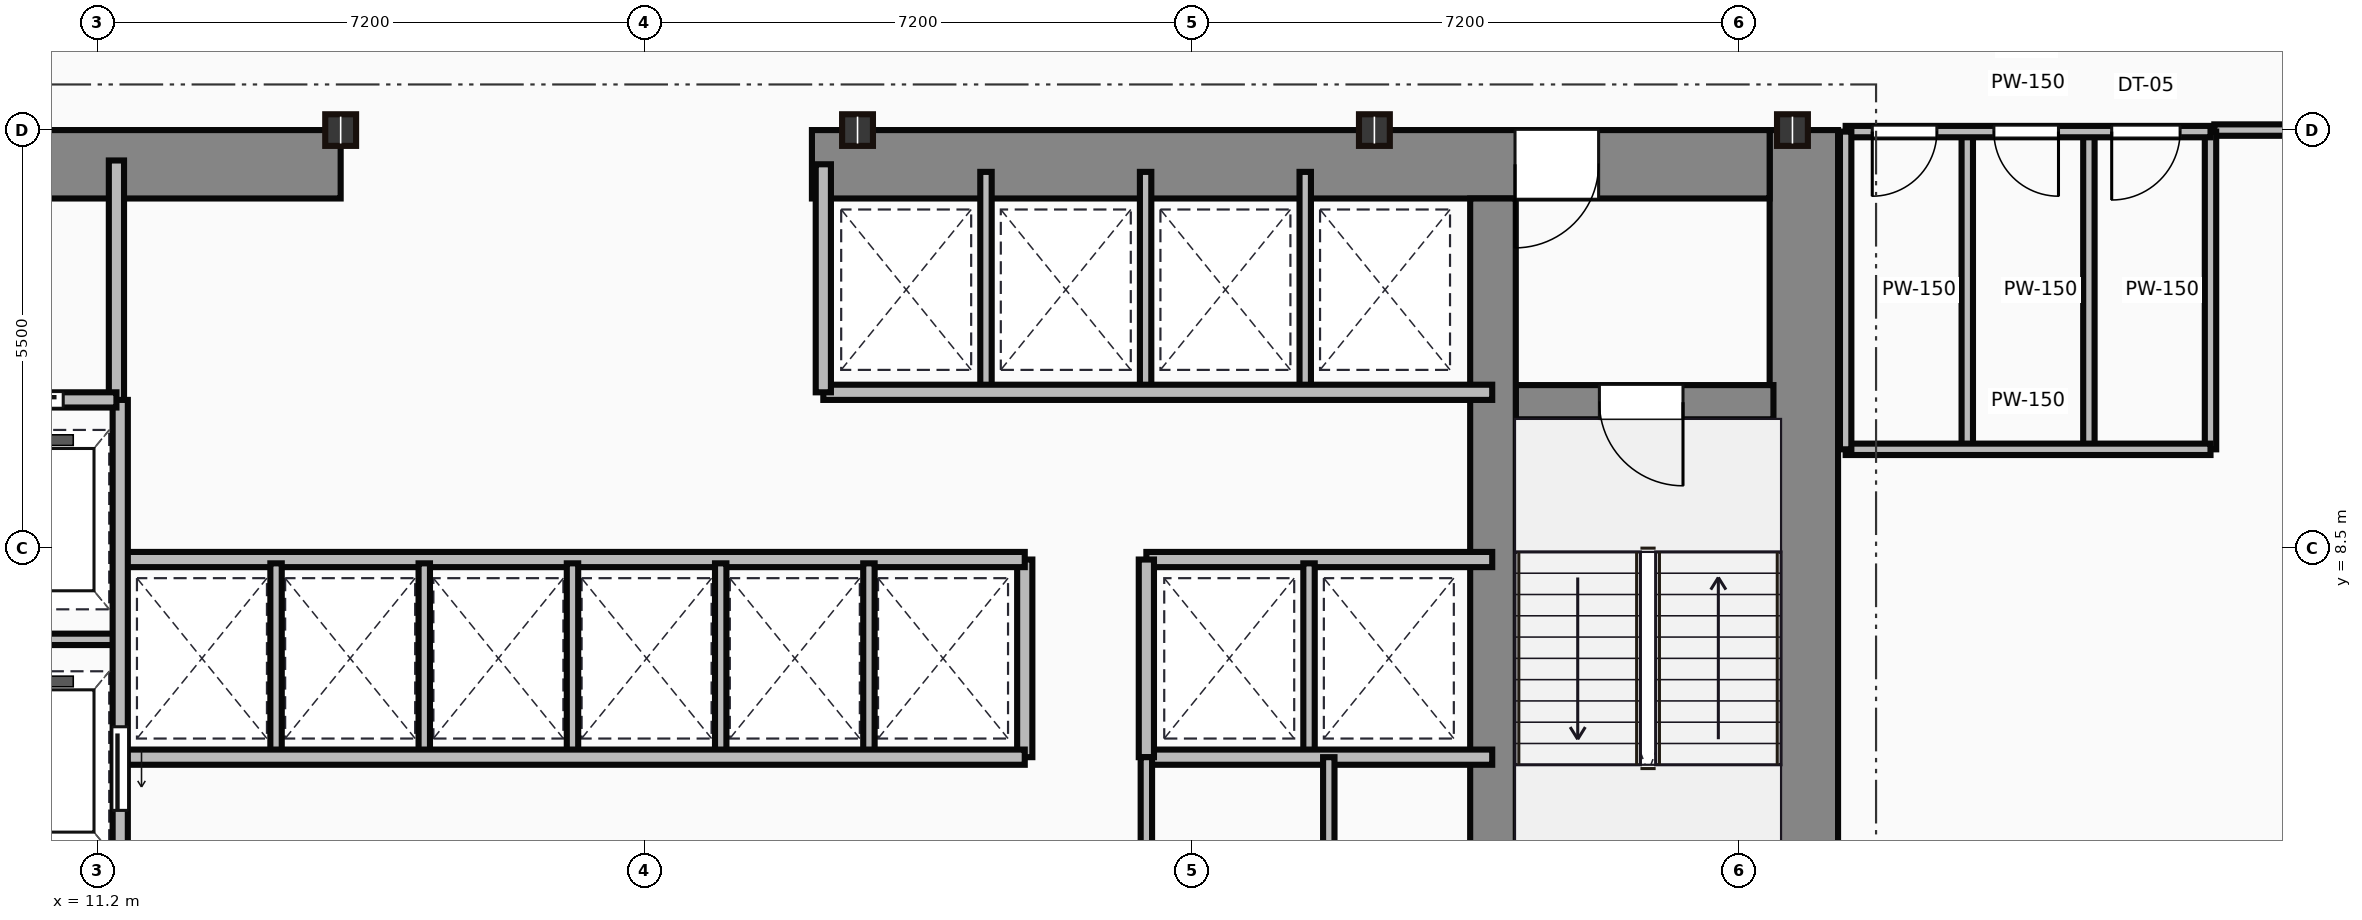
"""IFC4 building model, lengths in metres.
Left out: names, types, materials, properties, quantities, classifications, styles, units other than length and angle.
Written with IfcOpenShell. Run it as: python <this file> out.ifc"""

import sys

from ifc_helpers import new_model, si_unit, direction, frame, frame_2d, origin, origin_2d, place, context, subcontext, project, spatial, rectangle, i_section, extrude, source, transform, mapped, element, fill, save


model = new_model("IFC4")
c1 = context("Model", 3, precision=1e-05, world=origin(), true_north=direction((0.0, 1.0)))
c2 = subcontext(c1, "Body", "Model", "MODEL_VIEW")
j1 = project(units=[si_unit("LENGTHUNIT", "METRE"), si_unit("PLANEANGLEUNIT", "RADIAN")], contexts=[c1])
p1 = place(None, origin())
s1 = spatial("IfcSite", under=j1, at=p1, CompositionType="ELEMENT")
p2 = place(p1, origin())
s2 = spatial("IfcBuilding", under=s1, at=p2, CompositionType="ELEMENT")
p3 = place(p2, frame((0.0, 0.0, 36.15)))
s3 = spatial("IfcBuildingStorey", under=s2, at=p3, CompositionType="ELEMENT", Elevation=36.15)
m1 = source(origin(), c2, "Body", "SweptSolid", [
    extrude(rectangle(XDim=13.1, YDim=0.9, at=frame_2d((6.55, 0.0))), origin(), (0.0, 0.0, 1.0), 3.65),
])
p4 = place(p3, frame((33.65, 0.9, 0.0), z_axis=(0.0, 0.0, 1.0), x_axis=(0.0, 1.0, 0.0)))
e1 = element("IfcWall", 1, at=p4, inside=s3, PredefinedType="SHEAR", context=c2, shape_type="MappedRepresentation", body=[
    mapped(m1, transform((0.0, 0.0, 0.0))),
])
m2 = source(origin(), c2, "Body", "SweptSolid", [
    extrude(rectangle(XDim=9.1, YDim=0.9, at=frame_2d((4.55, 0.0))), origin(), (0.0, 0.0, 1.0), 3.65),
])
p5 = place(p3, frame((5.3, 13.55, 0.0), z_axis=(0.0, 0.0, 1.0), x_axis=(1.0, 0.0, 0.0)))
e2 = element("IfcWall", 2, at=p5, inside=s3, PredefinedType="SHEAR", context=c2, shape_type="MappedRepresentation", body=[
    mapped(m2, transform((0.0, 0.0, 0.0))),
])
p6 = place(p5, frame((4.1, 0.0, 0.0)))
e3 = element("IfcOpeningElement", 3, at=p6, cuts=e2, PredefinedType="OPENING", context=c2, shape_type="SweptSolid", body=[
    extrude(rectangle(XDim=1.1, YDim=2.15, at=frame_2d((0.55, 1.075))), frame((0.0, 0.46, 0.0), z_axis=(0.0, -1.0, 0.0), x_axis=(1.0, 0.0, 0.0)), (0.0, 0.0, 1.0), 0.92),
])
m3 = source(origin(), c2, "Body", "SweptSolid", [
    extrude(rectangle(XDim=12.6, YDim=0.9, at=frame_2d((6.3, 0.0))), origin(), (0.0, 0.0, 1.0), 3.65),
])
p7 = place(p3, frame((20.6, 13.55, 0.0), z_axis=(0.0, 0.0, 1.0), x_axis=(1.0, 0.0, 0.0)))
e4 = element("IfcWall", 4, at=p7, inside=s3, PredefinedType="SHEAR", context=c2, shape_type="MappedRepresentation", body=[
    mapped(m3, transform((0.0, 0.0, 0.0))),
])
p8 = place(p7, frame((9.25, 0.0, 0.0)))
e5 = element("IfcOpeningElement", 5, at=p8, cuts=e4, PredefinedType="OPENING", context=c2, shape_type="SweptSolid", body=[
    extrude(rectangle(XDim=1.1, YDim=2.15, at=frame_2d((0.55, 1.075))), frame((0.0, 0.46, 0.0), z_axis=(0.0, -1.0, 0.0), x_axis=(1.0, 0.0, 0.0)), (0.0, 0.0, 1.0), 0.92),
])
m4 = source(origin(), c2, "Body", "SweptSolid", [
    extrude(rectangle(XDim=12.2, YDim=0.6, at=frame_2d((6.1, 0.0))), origin(), (0.0, 0.0, 1.0), 3.65),
])
p9 = place(p3, frame((29.56, 0.9, 0.0), z_axis=(0.0, 0.0, 1.0), x_axis=(0.0, 1.0, 0.0)))
e6 = element("IfcWall", 6, at=p9, inside=s3, PredefinedType="SHEAR", context=c2, shape_type="MappedRepresentation", body=[
    mapped(m4, transform((0.0, 0.0, 0.0))),
])
m5 = source(origin(), c2, "Body", "SweptSolid", [
    extrude(rectangle(XDim=3.39, YDim=0.45, at=frame_2d((1.695, 0.0))), origin(), (0.0, 0.0, 1.0), 3.65),
])
p10 = place(p3, frame((29.86, 10.42, 0.0), z_axis=(0.0, 0.0, 1.0), x_axis=(1.0, 0.0, 0.0)))
e7 = element("IfcWall", 7, at=p10, inside=s3, PredefinedType="SHEAR", context=c2, shape_type="MappedRepresentation", body=[
    mapped(m5, transform((0.0, 0.0, 0.0))),
])
p11 = place(p10, frame((1.1, 0.0, 0.0)))
e8 = element("IfcOpeningElement", 8, at=p11, cuts=e7, PredefinedType="OPENING", context=c2, shape_type="SweptSolid", body=[
    extrude(rectangle(XDim=1.1, YDim=2.15, at=frame_2d((0.55, 1.075))), frame((0.0, 0.235, 0.0), z_axis=(0.0, -1.0, 0.0), x_axis=(1.0, 0.0, 0.0)), (0.0, 0.0, 1.0), 0.47),
])
m6 = source(origin(), c2, "Body", "SweptSolid", [
    extrude(i_section(OverallWidth=0.406, OverallDepth=0.416, WebThickness=0.03, FlangeThickness=0.048, at=origin_2d()), origin(), (0.0, 0.0, 1.0), 3.65),
])
for number, where, z_axis, x_axis in (
    (9, (14.4, 14.0, 0.0), (0.0, 0.0, 1.0), (1.0, 0.0, 0.0)),
    (10, (21.2, 14.0, 0.0), (0.0, 0.0, 1.0), (1.0, 0.0, 0.0)),
    (11, (28.0, 14.0, 0.0), (0.0, 0.0, 1.0), (1.0, 0.0, 0.0)),
    (12, (33.5, 14.0, 0.0), (0.0, 0.0, 1.0), (1.0, 0.0, 0.0)),
):
    element("IfcColumn", number, at=place(p3, frame(where, z_axis=z_axis, x_axis=x_axis)), inside=s3, PredefinedType="COLUMN", context=c2, shape_type="MappedRepresentation", body=[
        mapped(m6, transform((0.0, 0.0, 0.0))),
    ])
m7 = source(origin(), c2, "Body", "SweptSolid", [
    extrude(rectangle(XDim=3.18, YDim=0.2, at=frame_2d((1.59, 0.0))), origin(), (0.0, 0.0, 1.0), 3.4),
])
p12 = place(p3, frame((11.45, 10.42, 0.0), z_axis=(0.0, 0.0, 1.0), x_axis=(0.0, 1.0, 0.0)))
e13 = element("IfcWall", 13, at=p12, inside=s3, PredefinedType="PARTITIONING", context=c2, shape_type="MappedRepresentation", body=[
    mapped(m7, transform((0.0, 0.0, 0.0))),
])
m8 = source(origin(), c2, "Body", "SweptSolid", [
    extrude(rectangle(XDim=2.35, YDim=0.2, at=frame_2d((1.175, 0.0))), origin(), (0.0, 0.0, 1.0), 3.4),
])
p13 = place(p3, frame((9.1, 10.45, 0.0), z_axis=(0.0, 0.0, 1.0), x_axis=(1.0, 0.0, 0.0)))
e14 = element("IfcWall", 14, at=p13, inside=s3, PredefinedType="PARTITIONING", context=c2, shape_type="MappedRepresentation", body=[
    mapped(m8, transform((0.0, 0.0, 0.0))),
])
p14 = place(p13, frame((0.55, 0.0, 0.0)))
e15 = element("IfcOpeningElement", 15, at=p14, cuts=e14, PredefinedType="OPENING", context=c2, shape_type="SweptSolid", body=[
    extrude(rectangle(XDim=1.1, YDim=2.15, at=frame_2d((0.55, 1.075))), frame((0.0, 0.11, 0.0), z_axis=(0.0, -1.0, 0.0), x_axis=(1.0, 0.0, 0.0)), (0.0, 0.0, 1.0), 0.22),
])
m9 = source(origin(), c2, "Body", "SweptSolid", [
    extrude(rectangle(XDim=9.6, YDim=0.2, at=frame_2d((4.8, 0.0))), origin(), (0.0, 0.0, 1.0), 3.4),
])
p15 = place(p3, frame((11.5, 0.85, 0.0), z_axis=(0.0, 0.0, 1.0), x_axis=(0.0, 1.0, 0.0)))
e16 = element("IfcWall", 16, at=p15, inside=s3, PredefinedType="PARTITIONING", context=c2, shape_type="MappedRepresentation", body=[
    mapped(m9, transform((0.0, 0.0, 0.0))),
])
p16 = place(p15, frame((4.2, 0.0, 0.0)))
e17 = element("IfcOpeningElement", 17, at=p16, cuts=e16, PredefinedType="OPENING", context=c2, shape_type="SweptSolid", body=[
    extrude(rectangle(XDim=1.1, YDim=2.15, at=frame_2d((0.55, 1.075))), frame((0.0, 0.11, 0.0), z_axis=(0.0, -1.0, 0.0), x_axis=(1.0, 0.0, 0.0)), (0.0, 0.0, 1.0), 0.22),
])
p17 = place(p15, frame((0.9, 0.0, 0.0)))
e18 = element("IfcOpeningElement", 18, at=p17, cuts=e16, PredefinedType="OPENING", context=c2, shape_type="SweptSolid", body=[
    extrude(rectangle(XDim=1.2, YDim=2.15, at=frame_2d((0.6, 1.075))), frame((0.0, 0.11, 0.0), z_axis=(0.0, -1.0, 0.0), x_axis=(1.0, 0.0, 0.0)), (0.0, 0.0, 1.0), 0.22),
])
m10 = source(origin(), c2, "Body", "SweptSolid", [
    extrude(rectangle(XDim=2.4, YDim=0.15, at=frame_2d((1.2, 0.0))), origin(), (0.0, 0.0, 1.0), 3.4),
])
p18 = place(p3, frame((9.1, 7.3, 0.0), z_axis=(0.0, 0.0, 1.0), x_axis=(1.0, 0.0, 0.0)))
e19 = element("IfcWall", 19, at=p18, inside=s3, PredefinedType="PARTITIONING", context=c2, shape_type="MappedRepresentation", body=[
    mapped(m10, transform((0.0, 0.0, 0.0))),
])
m11 = source(origin(), c2, "Body", "SweptSolid", [
    extrude(rectangle(XDim=11.85, YDim=0.2, at=frame_2d((5.925, 0.0))), origin(), (0.0, 0.0, 1.0), 3.4),
])
for number, where, z_axis, x_axis in (
    (20, (11.55, 5.75, 0.0), (0.0, 0.0, 1.0), (1.0, 0.0, 0.0)),
    (21, (11.55, 8.35, 0.0), (0.0, 0.0, 1.0), (1.0, 0.0, 0.0)),
):
    element("IfcWall", number, at=place(p3, frame(where, z_axis=z_axis, x_axis=x_axis)), inside=s3, PredefinedType="PARTITIONING", context=c2, shape_type="MappedRepresentation", body=[
        mapped(m11, transform((0.0, 0.0, 0.0))),
    ])
m12 = source(origin(), c2, "Body", "SweptSolid", [
    extrude(rectangle(XDim=2.6, YDim=0.2, at=frame_2d((1.3, 0.0))), origin(), (0.0, 0.0, 1.0), 3.4),
])
p19 = place(p3, frame((23.4, 5.75, 0.0), z_axis=(0.0, 0.0, 1.0), x_axis=(0.0, 1.0, 0.0)))
e22 = element("IfcWall", 22, at=p19, inside=s3, PredefinedType="PARTITIONING", context=c2, shape_type="MappedRepresentation", body=[
    mapped(m12, transform((0.0, 0.0, 0.0))),
])
m13 = source(origin(), c2, "Body", "SweptSolid", [
    extrude(rectangle(XDim=2.5, YDim=0.15, at=frame_2d((1.25, 0.0))), origin(), (0.0, 0.0, 1.0), 3.4),
])
for number, where, z_axis, x_axis in (
    (23, (13.55, 5.8, 0.0), (0.0, 0.0, 1.0), (0.0, 1.0, 0.0)),
    (24, (15.5, 5.8, 0.0), (0.0, 0.0, 1.0), (0.0, 1.0, 0.0)),
    (25, (17.45, 5.8, 0.0), (0.0, 0.0, 1.0), (0.0, 1.0, 0.0)),
    (26, (19.4, 5.8, 0.0), (0.0, 0.0, 1.0), (0.0, 1.0, 0.0)),
    (27, (21.35, 5.8, 0.0), (0.0, 0.0, 1.0), (0.0, 1.0, 0.0)),
):
    element("IfcWall", number, at=place(p3, frame(where, z_axis=z_axis, x_axis=x_axis)), inside=s3, PredefinedType="PARTITIONING", context=c2, shape_type="MappedRepresentation", body=[
        mapped(m13, transform((0.0, 0.0, 0.0))),
    ])
m14 = source(origin(), c2, "Body", "SweptSolid", [
    extrude(rectangle(XDim=8.8, YDim=0.2, at=frame_2d((4.4, 0.0))), origin(), (0.0, 0.0, 1.0), 3.4),
])
p20 = place(p3, frame((20.75, 10.55, 0.0), z_axis=(0.0, 0.0, 1.0), x_axis=(1.0, 0.0, 0.0)))
e28 = element("IfcWall", 28, at=p20, inside=s3, PredefinedType="PARTITIONING", context=c2, shape_type="MappedRepresentation", body=[
    mapped(m14, transform((0.0, 0.0, 0.0))),
])
m15 = source(origin(), c2, "Body", "SweptSolid", [
    extrude(rectangle(XDim=3.0, YDim=0.2, at=frame_2d((1.5, 0.0))), origin(), (0.0, 0.0, 1.0), 3.4),
])
p21 = place(p3, frame((20.75, 10.55, 0.0), z_axis=(0.0, 0.0, 1.0), x_axis=(0.0, 1.0, 0.0)))
e29 = element("IfcWall", 29, at=p21, inside=s3, PredefinedType="PARTITIONING", context=c2, shape_type="MappedRepresentation", body=[
    mapped(m15, transform((0.0, 0.0, 0.0))),
])
m16 = source(origin(), c2, "Body", "SweptSolid", [
    extrude(rectangle(XDim=2.85, YDim=0.15, at=frame_2d((1.425, 0.0))), origin(), (0.0, 0.0, 1.0), 3.4),
])
for number, where, z_axis, x_axis in (
    (30, (22.89, 10.6, 0.0), (0.0, 0.0, 1.0), (0.0, 1.0, 0.0)),
    (31, (24.99, 10.6, 0.0), (0.0, 0.0, 1.0), (0.0, 1.0, 0.0)),
    (32, (27.09, 10.6, 0.0), (0.0, 0.0, 1.0), (0.0, 1.0, 0.0)),
):
    element("IfcWall", number, at=place(p3, frame(where, z_axis=z_axis, x_axis=x_axis)), inside=s3, PredefinedType="PARTITIONING", context=c2, shape_type="MappedRepresentation", body=[
        mapped(m16, transform((0.0, 0.0, 0.0))),
    ])
m17 = source(origin(), c2, "Body", "SweptSolid", [
    extrude(rectangle(XDim=4.55, YDim=0.2, at=frame_2d((2.275, 0.0))), origin(), (0.0, 0.0, 1.0), 3.4),
])
for number, where, z_axis, x_axis in (
    (33, (25.0, 8.35, 0.0), (0.0, 0.0, 1.0), (1.0, 0.0, 0.0)),
    (34, (25.0, 5.75, 0.0), (0.0, 0.0, 1.0), (1.0, 0.0, 0.0)),
):
    element("IfcWall", number, at=place(p3, frame(where, z_axis=z_axis, x_axis=x_axis)), inside=s3, PredefinedType="PARTITIONING", context=c2, shape_type="MappedRepresentation", body=[
        mapped(m17, transform((0.0, 0.0, 0.0))),
    ])
p22 = place(p3, frame((25.0, 5.75, 0.0), z_axis=(0.0, 0.0, 1.0), x_axis=(0.0, 1.0, 0.0)))
e35 = element("IfcWall", 35, at=p22, inside=s3, PredefinedType="PARTITIONING", context=c2, shape_type="MappedRepresentation", body=[
    mapped(m12, transform((0.0, 0.0, 0.0))),
])
p23 = place(p3, frame((27.14, 5.8, 0.0), z_axis=(0.0, 0.0, 1.0), x_axis=(0.0, 1.0, 0.0)))
e36 = element("IfcWall", 36, at=p23, inside=s3, PredefinedType="PARTITIONING", context=c2, shape_type="MappedRepresentation", body=[
    mapped(m13, transform((0.0, 0.0, 0.0))),
])
m18 = source(origin(), c2, "Body", "SweptSolid", [
    extrude(rectangle(XDim=4.9, YDim=0.15, at=frame_2d((2.45, 0.0))), origin(), (0.0, 0.0, 1.0), 3.4),
])
p24 = place(p3, frame((25.0, 0.85, 0.0), z_axis=(0.0, 0.0, 1.0), x_axis=(0.0, 1.0, 0.0)))
e37 = element("IfcWall", 37, at=p24, inside=s3, PredefinedType="PARTITIONING", context=c2, shape_type="MappedRepresentation", body=[
    mapped(m18, transform((0.0, 0.0, 0.0))),
])
p25 = place(p24, frame((2.5, 0.0, 0.0)))
e38 = element("IfcOpeningElement", 38, at=p25, cuts=e37, PredefinedType="OPENING", context=c2, shape_type="SweptSolid", body=[
    extrude(rectangle(XDim=0.95, YDim=2.15, at=frame_2d((0.475, 1.075))), frame((0.0, 0.085, 0.0), z_axis=(0.0, -1.0, 0.0), x_axis=(1.0, 0.0, 0.0)), (0.0, 0.0, 1.0), 0.17),
])
m19 = source(origin(), c2, "Body", "SweptSolid", [
    extrude(rectangle(XDim=3.4, YDim=0.15, at=frame_2d((1.7, 0.0))), origin(), (0.0, 0.0, 1.0), 3.4),
])
p26 = place(p3, frame((27.4, 2.35, 0.0), z_axis=(0.0, 0.0, 1.0), x_axis=(0.0, 1.0, 0.0)))
e39 = element("IfcWall", 39, at=p26, inside=s3, PredefinedType="PARTITIONING", context=c2, shape_type="MappedRepresentation", body=[
    mapped(m19, transform((0.0, 0.0, 0.0))),
])
p27 = place(p26, frame((1.1, 0.0, 0.0)))
e40 = element("IfcOpeningElement", 40, at=p27, cuts=e39, PredefinedType="OPENING", context=c2, shape_type="SweptSolid", body=[
    extrude(rectangle(XDim=0.85, YDim=2.1, at=frame_2d((0.425, 1.05))), frame((0.0, 0.085, 0.0), z_axis=(0.0, -1.0, 0.0), x_axis=(1.0, 0.0, 0.0)), (0.0, 0.0, 1.0), 0.17),
])
m20 = source(origin(), c2, "Body", "SweptSolid", [
    extrude(rectangle(XDim=4.8, YDim=0.15, at=frame_2d((2.4, 0.0))), origin(), (0.0, 0.0, 1.0), 2.625),
])
p28 = place(p3, frame((34.2, 13.98, 0.0), z_axis=(0.0, 0.0, 1.0), x_axis=(1.0, 0.0, 0.0)))
e41 = element("IfcWall", 41, at=p28, inside=s3, PredefinedType="PARTITIONING", context=c2, shape_type="MappedRepresentation", body=[
    mapped(m20, transform((0.0, 0.0, 0.0))),
])
p29 = place(p28, frame((0.35, 0.0, 0.0)))
e42 = element("IfcOpeningElement", 42, at=p29, cuts=e41, PredefinedType="OPENING", context=c2, shape_type="SweptSolid", body=[
    extrude(rectangle(XDim=0.85, YDim=2.1, at=frame_2d((0.425, 1.05))), frame((0.0, 0.085, 0.0), z_axis=(0.0, -1.0, 0.0), x_axis=(1.0, 0.0, 0.0)), (0.0, 0.0, 1.0), 0.17),
])
p30 = place(p28, frame((1.95, 0.0, 0.0)))
e43 = element("IfcOpeningElement", 43, at=p30, cuts=e41, PredefinedType="OPENING", context=c2, shape_type="SweptSolid", body=[
    extrude(rectangle(XDim=0.85, YDim=2.1, at=frame_2d((0.425, 1.05))), frame((0.0, 0.085, 0.0), z_axis=(0.0, -1.0, 0.0), x_axis=(1.0, 0.0, 0.0)), (0.0, 0.0, 1.0), 0.17),
])
p31 = place(p28, frame((3.5, 0.0, 0.0)))
e44 = element("IfcOpeningElement", 44, at=p31, cuts=e41, PredefinedType="OPENING", context=c2, shape_type="SweptSolid", body=[
    extrude(rectangle(XDim=0.9, YDim=2.1, at=frame_2d((0.45, 1.05))), frame((0.0, 0.085, 0.0), z_axis=(0.0, -1.0, 0.0), x_axis=(1.0, 0.0, 0.0)), (0.0, 0.0, 1.0), 0.17),
])
m21 = source(origin(), c2, "Body", "SweptSolid", [
    extrude(rectangle(XDim=4.8, YDim=0.15, at=frame_2d((2.4, 0.0))), origin(), (0.0, 0.0, 1.0), 3.4),
])
p32 = place(p3, frame((34.2, 9.8, 0.0), z_axis=(0.0, 0.0, 1.0), x_axis=(1.0, 0.0, 0.0)))
e45 = element("IfcWall", 45, at=p32, inside=s3, PredefinedType="PARTITIONING", context=c2, shape_type="MappedRepresentation", body=[
    mapped(m21, transform((0.0, 0.0, 0.0))),
])
m22 = source(origin(), c2, "Body", "SweptSolid", [
    extrude(rectangle(XDim=4.18, YDim=0.15, at=frame_2d((2.09, 0.0))), origin(), (0.0, 0.0, 1.0), 3.4),
])
for number, where, z_axis, x_axis in (
    (46, (39.0, 9.8, 0.0), (0.0, 0.0, 1.0), (0.0, 1.0, 0.0)),
    (47, (34.2, 9.8, 0.0), (0.0, 0.0, 1.0), (0.0, 1.0, 0.0)),
    (48, (35.8, 9.8, 0.0), (0.0, 0.0, 1.0), (0.0, 1.0, 0.0)),
    (49, (37.4, 9.8, 0.0), (0.0, 0.0, 1.0), (0.0, 1.0, 0.0)),
):
    element("IfcWall", number, at=place(p3, frame(where, z_axis=z_axis, x_axis=x_axis)), inside=s3, PredefinedType="PARTITIONING", context=c2, shape_type="MappedRepresentation", body=[
        mapped(m22, transform((0.0, 0.0, 0.0))),
    ])
m23 = source(origin(), c2, "Body", "SweptSolid", [
    extrude(rectangle(XDim=7.75, YDim=0.15, at=frame_2d((3.875, 0.0))), origin(), (0.0, 0.0, 1.0), 2.625),
])
p33 = place(p3, frame((46.8, 14.0, 0.0), z_axis=(0.0, 0.0, 1.0), x_axis=(-1.0, 0.0, 0.0)))
e50 = element("IfcWall", 50, at=p33, inside=s3, PredefinedType="PARTITIONING", context=c2, shape_type="MappedRepresentation", body=[
    mapped(m23, transform((0.0, 0.0, 0.0))),
])
m24 = source(origin(), c2, "Body", "SweptSolid", [
    extrude(rectangle(XDim=1.1, YDim=2.15, at=frame_2d((0.55, 1.075))), frame((0.0, 0.025, 0.0), z_axis=(0.0, -1.0, 0.0), x_axis=(1.0, 0.0, 0.0)), (0.0, 0.0, 1.0), 0.05),
])
p34 = place(p11, frame((1.1, 0.0, 0.0), z_axis=(0.0, 0.0, 1.0), x_axis=(-1.0, 0.0, 0.0)))
e51 = element("IfcDoor", 51, at=p34, inside=s3, OperationType="SINGLE_SWING_RIGHT", PredefinedType="DOOR", context=c2, shape_type="MappedRepresentation", body=[
    mapped(m24, transform((0.0, 0.0, 0.0))),
])
fill(e8, e51)
p35 = place(p8, origin())
e52 = element("IfcDoor", 52, at=p35, inside=s3, OperationType="SINGLE_SWING_LEFT", PredefinedType="DOOR", context=c2, shape_type="MappedRepresentation", body=[
    mapped(m24, transform((0.0, 0.0, 0.0))),
])
fill(e5, e52)
p36 = place(p14, origin())
e53 = element("IfcDoor", 53, at=p36, inside=s3, OperationType="SLIDING_TO_LEFT", PredefinedType="DOOR", context=c2, shape_type="MappedRepresentation", body=[
    mapped(m24, transform((0.0, 0.0, 0.0))),
])
fill(e15, e53)
p37 = place(p16, frame((1.1, 0.0, 0.0), z_axis=(0.0, 0.0, 1.0), x_axis=(-1.0, 0.0, 0.0)))
e54 = element("IfcDoor", 54, at=p37, inside=s3, OperationType="SLIDING_TO_LEFT", PredefinedType="DOOR", context=c2, shape_type="MappedRepresentation", body=[
    mapped(m24, transform((0.0, 0.0, 0.0))),
])
fill(e17, e54)
m25 = source(origin(), c2, "Body", "SweptSolid", [
    extrude(rectangle(XDim=0.85, YDim=2.1, at=frame_2d((0.425, 1.05))), frame((0.0, 0.025, 0.0), z_axis=(0.0, -1.0, 0.0), x_axis=(1.0, 0.0, 0.0)), (0.0, 0.0, 1.0), 0.05),
])
p38 = place(p29, frame((0.85, 0.0, 0.0), z_axis=(0.0, 0.0, 1.0), x_axis=(-1.0, 0.0, 0.0)))
e55 = element("IfcDoor", 55, at=p38, inside=s3, OperationType="SINGLE_SWING_LEFT", PredefinedType="DOOR", context=c2, shape_type="MappedRepresentation", body=[
    mapped(m25, transform((0.0, 0.0, 0.0))),
])
fill(e42, e55)
p39 = place(p30, frame((0.85, 0.0, 0.0), z_axis=(0.0, 0.0, 1.0), x_axis=(-1.0, 0.0, 0.0)))
e56 = element("IfcDoor", 56, at=p39, inside=s3, OperationType="SINGLE_SWING_RIGHT", PredefinedType="DOOR", context=c2, shape_type="MappedRepresentation", body=[
    mapped(m25, transform((0.0, 0.0, 0.0))),
])
fill(e43, e56)
m26 = source(origin(), c2, "Body", "SweptSolid", [
    extrude(rectangle(XDim=0.9, YDim=2.1, at=frame_2d((0.45, 1.05))), frame((0.0, 0.025, 0.0), z_axis=(0.0, -1.0, 0.0), x_axis=(1.0, 0.0, 0.0)), (0.0, 0.0, 1.0), 0.05),
])
p40 = place(p31, frame((0.9, 0.0, 0.0), z_axis=(0.0, 0.0, 1.0), x_axis=(-1.0, 0.0, 0.0)))
e57 = element("IfcDoor", 57, at=p40, inside=s3, OperationType="SINGLE_SWING_LEFT", PredefinedType="DOOR", context=c2, shape_type="MappedRepresentation", body=[
    mapped(m26, transform((0.0, 0.0, 0.0))),
])
fill(e44, e57)
save(model, sys.argv[1])
